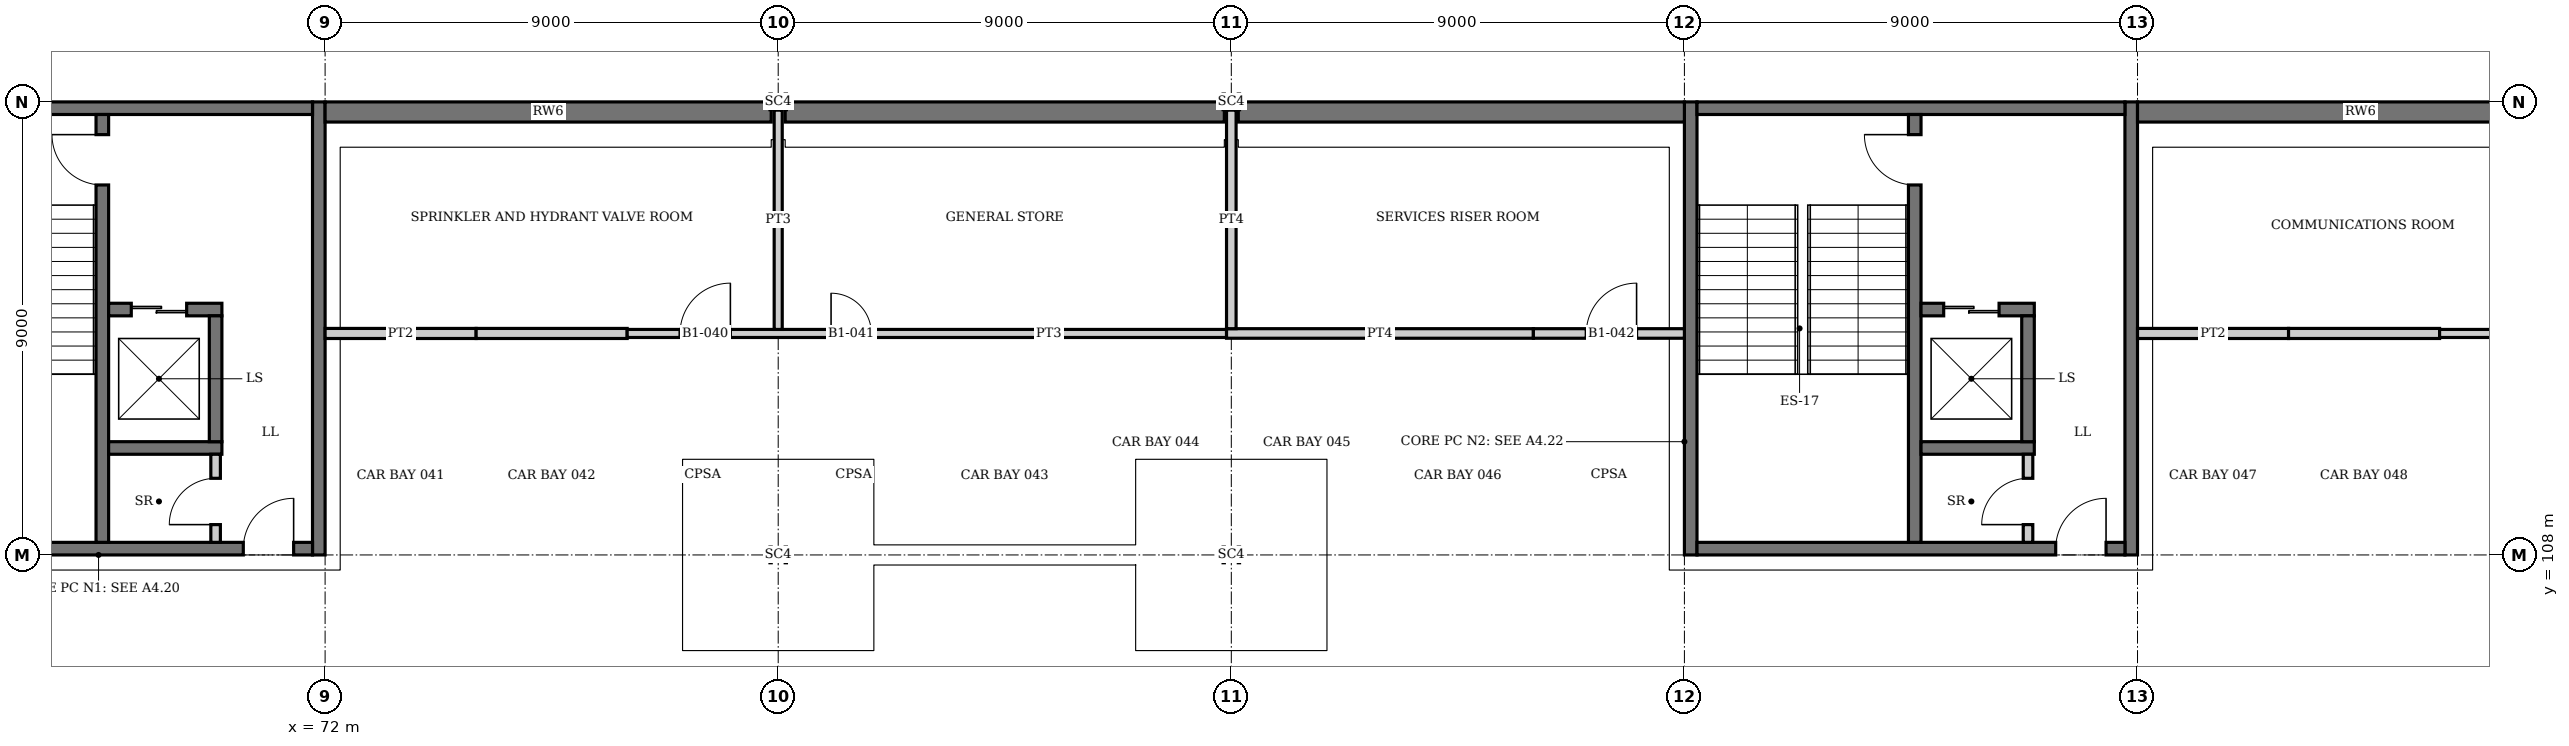
"""IFC4 building model, lengths in metres.
Left out: names, types, materials, properties, quantities, classifications, styles, units other than length and angle.
Written with IfcOpenShell. Run it as: python <this file> out.ifc"""

import sys

from ifc_helpers import new_model, si_unit, direction, frame, frame_2d, origin, origin_2d, place, context, subcontext, project, spatial, rectangle, i_section, extrude, element, fill, save


model = new_model("IFC4")
c1 = context("Model", 3, precision=1e-05, world=origin(), true_north=direction((0.0, 1.0)))
c2 = subcontext(c1, "Body", "Model", "MODEL_VIEW")
j1 = project(units=[si_unit("LENGTHUNIT", "METRE"), si_unit("PLANEANGLEUNIT", "RADIAN")], contexts=[c1])
p1 = place(None, origin())
s1 = spatial("IfcSite", under=j1, at=p1, CompositionType="ELEMENT")
p2 = place(p1, origin())
s2 = spatial("IfcBuilding", under=s1, at=p2, CompositionType="ELEMENT")
p3 = place(p2, frame((0.0, 0.0, -4.5)))
s3 = spatial("IfcBuildingStorey", under=s2, at=p3, CompositionType="ELEMENT", Elevation=-4.5)
for number, where, z_axis, x_axis in (
    (1, (81.0, 108.0, 0.0), (0.0, 0.0, 1.0), (0.0, 1.0, 0.0)),
    (2, (81.0, 117.0, 0.0), (0.0, 0.0, 1.0), (0.0, 1.0, 0.0)),
    (3, (90.0, 108.0, 0.0), (0.0, 0.0, 1.0), (0.0, 1.0, 0.0)),
    (4, (90.0, 117.0, 0.0), (0.0, 0.0, 1.0), (0.0, 1.0, 0.0)),
):
    element("IfcColumn", number, at=place(p3, frame(where, z_axis=z_axis, x_axis=x_axis)), inside=s3, PredefinedType="COLUMN", context=c2, shape_type="SweptSolid", body=[
        extrude(i_section(OverallWidth=0.311, OverallDepth=0.327, WebThickness=0.016, FlangeThickness=0.025, at=origin_2d()), origin(), (0.0, 0.0, 1.0), 4.5),
    ])
p4 = place(p3, frame((71.875, 108.0, 0.0), z_axis=(0.0, 0.0, 1.0), x_axis=(0.0, 1.0, 0.0)))
e5 = element("IfcWall", 5, at=p4, inside=s3, PredefinedType="SHEAR", context=c2, shape_type="SweptSolid", body=[
    extrude(rectangle(XDim=9.0, YDim=0.25, at=frame_2d((4.5, 0.0))), origin(), (0.0, 0.0, 1.0), 4.5),
])
p5 = place(p3, frame((63.25, 108.125, 0.0), z_axis=(0.0, 0.0, 1.0), x_axis=(1.0, 0.0, 0.0)))
e6 = element("IfcWall", 6, at=p5, inside=s3, PredefinedType="SHEAR", context=c2, shape_type="SweptSolid", body=[
    extrude(rectangle(XDim=8.5, YDim=0.25, at=frame_2d((4.25, 0.0))), origin(), (0.0, 0.0, 1.0), 4.5),
])
p6 = place(p5, frame((7.125, 0.0, 0.0)))
e7 = element("IfcOpeningElement", 7, at=p6, cuts=e6, PredefinedType="OPENING", context=c2, shape_type="SweptSolid", body=[
    extrude(rectangle(XDim=1.0, YDim=2.1, at=frame_2d((0.5, 1.05))), frame((0.0, 0.135, 0.0), z_axis=(0.0, -1.0, 0.0), x_axis=(1.0, 0.0, 0.0)), (0.0, 0.0, 1.0), 0.27),
])
p7 = place(p3, frame((63.25, 116.875, 0.0), z_axis=(0.0, 0.0, 1.0), x_axis=(1.0, 0.0, 0.0)))
e8 = element("IfcWall", 8, at=p7, inside=s3, PredefinedType="SHEAR", context=c2, shape_type="SweptSolid", body=[
    extrude(rectangle(XDim=8.5, YDim=0.25, at=frame_2d((4.25, 0.0))), origin(), (0.0, 0.0, 1.0), 4.5),
])
for number, where, z_axis, x_axis in (
    (9, (99.125, 108.0, 0.0), (0.0, 0.0, 1.0), (0.0, 1.0, 0.0)),
    (10, (107.875, 108.0, 0.0), (0.0, 0.0, 1.0), (0.0, 1.0, 0.0)),
):
    element("IfcWall", number, at=place(p3, frame(where, z_axis=z_axis, x_axis=x_axis)), inside=s3, PredefinedType="SHEAR", context=c2, shape_type="SweptSolid", body=[
        extrude(rectangle(XDim=9.0, YDim=0.25, at=frame_2d((4.5, 0.0))), origin(), (0.0, 0.0, 1.0), 4.5),
    ])
p8 = place(p3, frame((99.25, 108.125, 0.0), z_axis=(0.0, 0.0, 1.0), x_axis=(1.0, 0.0, 0.0)))
e11 = element("IfcWall", 11, at=p8, inside=s3, PredefinedType="SHEAR", context=c2, shape_type="SweptSolid", body=[
    extrude(rectangle(XDim=8.5, YDim=0.25, at=frame_2d((4.25, 0.0))), origin(), (0.0, 0.0, 1.0), 4.5),
])
p9 = place(p8, frame((7.125, 0.0, 0.0)))
e12 = element("IfcOpeningElement", 12, at=p9, cuts=e11, PredefinedType="OPENING", context=c2, shape_type="SweptSolid", body=[
    extrude(rectangle(XDim=1.0, YDim=2.1, at=frame_2d((0.5, 1.05))), frame((0.0, 0.135, 0.0), z_axis=(0.0, -1.0, 0.0), x_axis=(1.0, 0.0, 0.0)), (0.0, 0.0, 1.0), 0.27),
])
p10 = place(p3, frame((99.25, 116.875, 0.0), z_axis=(0.0, 0.0, 1.0), x_axis=(1.0, 0.0, 0.0)))
e13 = element("IfcWall", 13, at=p10, inside=s3, PredefinedType="SHEAR", context=c2, shape_type="SweptSolid", body=[
    extrude(rectangle(XDim=8.5, YDim=0.25, at=frame_2d((4.25, 0.0))), origin(), (0.0, 0.0, 1.0), 4.5),
])
p11 = place(p3, frame((72.0, 116.8, 0.0), z_axis=(0.0, 0.0, 1.0), x_axis=(1.0, 0.0, 0.0)))
e14 = element("IfcWall", 14, at=p11, inside=s3, PredefinedType="SOLIDWALL", context=c2, shape_type="SweptSolid", body=[
    extrude(rectangle(XDim=8.862, YDim=0.4, at=frame_2d((4.431, 0.0))), origin(), (0.0, 0.0, 1.0), 4.5),
])
p12 = place(p3, frame((81.138, 116.8, 0.0), z_axis=(0.0, 0.0, 1.0), x_axis=(1.0, 0.0, 0.0)))
e15 = element("IfcWall", 15, at=p12, inside=s3, PredefinedType="SOLIDWALL", context=c2, shape_type="SweptSolid", body=[
    extrude(rectangle(XDim=8.723, YDim=0.4, at=frame_2d((4.362, 0.0))), origin(), (0.0, 0.0, 1.0), 4.5),
])
for number, where, z_axis, x_axis in (
    (16, (90.138, 116.8, 0.0), (0.0, 0.0, 1.0), (1.0, 0.0, 0.0)),
    (17, (108.0, 116.8, 0.0), (0.0, 0.0, 1.0), (1.0, 0.0, 0.0)),
):
    element("IfcWall", number, at=place(p3, frame(where, z_axis=z_axis, x_axis=x_axis)), inside=s3, PredefinedType="SOLIDWALL", context=c2, shape_type="SweptSolid", body=[
        extrude(rectangle(XDim=8.862, YDim=0.4, at=frame_2d((4.431, 0.0))), origin(), (0.0, 0.0, 1.0), 4.5),
    ])
p13 = place(p3, frame((67.575, 116.75, 0.0), z_axis=(0.0, 0.0, 1.0), x_axis=(0.0, -1.0, 0.0)))
e18 = element("IfcWall", 18, at=p13, inside=s3, PredefinedType="SOLIDWALL", context=c2, shape_type="SweptSolid", body=[
    extrude(rectangle(XDim=8.5, YDim=0.25, at=frame_2d((4.25, 0.0))), origin(), (0.0, 0.0, 1.0), 4.25),
])
p14 = place(p13, frame((0.4, 0.0, 0.0)))
e19 = element("IfcOpeningElement", 19, at=p14, cuts=e18, PredefinedType="OPENING", context=c2, shape_type="SweptSolid", body=[
    extrude(rectangle(XDim=1.0, YDim=2.1, at=frame_2d((0.5, 1.05))), frame((0.0, 0.135, 0.0), z_axis=(0.0, -1.0, 0.0), x_axis=(1.0, 0.0, 0.0)), (0.0, 0.0, 1.0), 0.27),
])
p15 = place(p3, frame((67.7, 110.125, 0.0), z_axis=(0.0, 0.0, 1.0), x_axis=(1.0, 0.0, 0.0)))
e20 = element("IfcWall", 20, at=p15, inside=s3, PredefinedType="SOLIDWALL", context=c2, shape_type="SweptSolid", body=[
    extrude(rectangle(XDim=2.25, YDim=0.25, at=frame_2d((1.125, 0.0))), origin(), (0.0, 0.0, 1.0), 4.5),
])
p16 = place(p3, frame((67.7, 112.875, 0.0), z_axis=(0.0, 0.0, 1.0), x_axis=(1.0, 0.0, 0.0)))
e21 = element("IfcWall", 21, at=p16, inside=s3, PredefinedType="SOLIDWALL", context=c2, shape_type="SweptSolid", body=[
    extrude(rectangle(XDim=2.25, YDim=0.25, at=frame_2d((1.125, 0.0))), origin(), (0.0, 0.0, 1.0), 4.5),
])
p17 = place(p16, frame((0.45, 0.0, 0.0)))
e22 = element("IfcOpeningElement", 22, at=p17, cuts=e21, PredefinedType="OPENING", context=c2, shape_type="SweptSolid", body=[
    extrude(rectangle(XDim=1.1, YDim=2.1, at=frame_2d((0.55, 1.05))), frame((0.0, 0.135, 0.0), z_axis=(0.0, -1.0, 0.0), x_axis=(1.0, 0.0, 0.0)), (0.0, 0.0, 1.0), 0.27),
])
p18 = place(p3, frame((69.825, 110.25, 0.0), z_axis=(0.0, 0.0, 1.0), x_axis=(0.0, 1.0, 0.0)))
e23 = element("IfcWall", 23, at=p18, inside=s3, PredefinedType="SOLIDWALL", context=c2, shape_type="SweptSolid", body=[
    extrude(rectangle(XDim=2.5, YDim=0.25, at=frame_2d((1.25, 0.0))), origin(), (0.0, 0.0, 1.0), 4.5),
])
p19 = place(p3, frame((103.575, 116.75, 0.0), z_axis=(0.0, 0.0, 1.0), x_axis=(0.0, -1.0, 0.0)))
e24 = element("IfcWall", 24, at=p19, inside=s3, PredefinedType="SOLIDWALL", context=c2, shape_type="SweptSolid", body=[
    extrude(rectangle(XDim=8.5, YDim=0.25, at=frame_2d((4.25, 0.0))), origin(), (0.0, 0.0, 1.0), 4.25),
])
p20 = place(p19, frame((0.4, 0.0, 0.0)))
e25 = element("IfcOpeningElement", 25, at=p20, cuts=e24, PredefinedType="OPENING", context=c2, shape_type="SweptSolid", body=[
    extrude(rectangle(XDim=1.0, YDim=2.1, at=frame_2d((0.5, 1.05))), frame((0.0, 0.135, 0.0), z_axis=(0.0, -1.0, 0.0), x_axis=(1.0, 0.0, 0.0)), (0.0, 0.0, 1.0), 0.27),
])
p21 = place(p3, frame((103.7, 110.125, 0.0), z_axis=(0.0, 0.0, 1.0), x_axis=(1.0, 0.0, 0.0)))
e26 = element("IfcWall", 26, at=p21, inside=s3, PredefinedType="SOLIDWALL", context=c2, shape_type="SweptSolid", body=[
    extrude(rectangle(XDim=2.25, YDim=0.25, at=frame_2d((1.125, 0.0))), origin(), (0.0, 0.0, 1.0), 4.5),
])
p22 = place(p3, frame((103.7, 112.875, 0.0), z_axis=(0.0, 0.0, 1.0), x_axis=(1.0, 0.0, 0.0)))
e27 = element("IfcWall", 27, at=p22, inside=s3, PredefinedType="SOLIDWALL", context=c2, shape_type="SweptSolid", body=[
    extrude(rectangle(XDim=2.25, YDim=0.25, at=frame_2d((1.125, 0.0))), origin(), (0.0, 0.0, 1.0), 4.5),
])
p23 = place(p22, frame((0.45, 0.0, 0.0)))
e28 = element("IfcOpeningElement", 28, at=p23, cuts=e27, PredefinedType="OPENING", context=c2, shape_type="SweptSolid", body=[
    extrude(rectangle(XDim=1.1, YDim=2.1, at=frame_2d((0.55, 1.05))), frame((0.0, 0.135, 0.0), z_axis=(0.0, -1.0, 0.0), x_axis=(1.0, 0.0, 0.0)), (0.0, 0.0, 1.0), 0.27),
])
p24 = place(p3, frame((105.825, 110.25, 0.0), z_axis=(0.0, 0.0, 1.0), x_axis=(0.0, 1.0, 0.0)))
e29 = element("IfcWall", 29, at=p24, inside=s3, PredefinedType="SOLIDWALL", context=c2, shape_type="SweptSolid", body=[
    extrude(rectangle(XDim=2.5, YDim=0.25, at=frame_2d((1.25, 0.0))), origin(), (0.0, 0.0, 1.0), 4.5),
])
p25 = place(p3, frame((72.0, 112.4, 0.0), z_axis=(0.0, 0.0, 1.0), x_axis=(1.0, 0.0, 0.0)))
e30 = element("IfcWall", 30, at=p25, inside=s3, PredefinedType="PARTITIONING", context=c2, shape_type="SweptSolid", body=[
    extrude(rectangle(XDim=3.0, YDim=0.2, at=frame_2d((1.5, 0.0))), origin(), (0.0, 0.0, 1.0), 4.25),
])
p26 = place(p3, frame((75.0, 112.4, 0.0), z_axis=(0.0, 0.0, 1.0), x_axis=(1.0, 0.0, 0.0)))
e31 = element("IfcWall", 31, at=p26, inside=s3, PredefinedType="PARTITIONING", context=c2, shape_type="SweptSolid", body=[
    extrude(rectangle(XDim=3.0, YDim=0.2, at=frame_2d((1.5, 0.0))), origin(), (0.0, 0.0, 1.0), 3.79),
])
p27 = place(p3, frame((78.0, 112.4, 0.0), z_axis=(0.0, 0.0, 1.0), x_axis=(1.0, 0.0, 0.0)))
e32 = element("IfcWall", 32, at=p27, inside=s3, PredefinedType="PARTITIONING", context=c2, shape_type="SweptSolid", body=[
    extrude(rectangle(XDim=11.905, YDim=0.16, at=frame_2d((5.953, 0.0))), origin(), (0.0, 0.0, 1.0), 3.79),
])
p28 = place(p27, frame((1.05, 0.0, 0.0)))
e33 = element("IfcOpeningElement", 33, at=p28, cuts=e32, PredefinedType="OPENING", context=c2, shape_type="SweptSolid", body=[
    extrude(rectangle(XDim=1.0, YDim=2.1, at=frame_2d((0.5, 1.05))), frame((0.0, 0.09, 0.0), z_axis=(0.0, -1.0, 0.0), x_axis=(1.0, 0.0, 0.0)), (0.0, 0.0, 1.0), 0.18),
])
p29 = place(p27, frame((4.05, 0.0, 0.0)))
e34 = element("IfcOpeningElement", 34, at=p29, cuts=e32, PredefinedType="OPENING", context=c2, shape_type="SweptSolid", body=[
    extrude(rectangle(XDim=0.8, YDim=2.0, at=frame_2d((0.4, 1.0))), frame((0.0, 0.09, 0.0), z_axis=(0.0, -1.0, 0.0), x_axis=(1.0, 0.0, 0.0)), (0.0, 0.0, 1.0), 0.18),
])
p30 = place(p3, frame((89.905, 112.4, 0.0), z_axis=(0.0, 0.0, 1.0), x_axis=(1.0, 0.0, 0.0)))
e35 = element("IfcWall", 35, at=p30, inside=s3, PredefinedType="PARTITIONING", context=c2, shape_type="SweptSolid", body=[
    extrude(rectangle(XDim=6.095, YDim=0.19, at=frame_2d((3.047, 0.0))), origin(), (0.0, 0.0, 1.0), 3.79),
])
p31 = place(p3, frame((96.0, 112.4, 0.0), z_axis=(0.0, 0.0, 1.0), x_axis=(1.0, 0.0, 0.0)))
e36 = element("IfcWall", 36, at=p31, inside=s3, PredefinedType="PARTITIONING", context=c2, shape_type="SweptSolid", body=[
    extrude(rectangle(XDim=3.0, YDim=0.19, at=frame_2d((1.5, 0.0))), origin(), (0.0, 0.0, 1.0), 4.25),
])
p32 = place(p31, frame((1.05, 0.0, 0.0)))
e37 = element("IfcOpeningElement", 37, at=p32, cuts=e36, PredefinedType="OPENING", context=c2, shape_type="SweptSolid", body=[
    extrude(rectangle(XDim=1.0, YDim=2.4, at=frame_2d((0.5, 1.2))), frame((0.0, 0.105, 0.0), z_axis=(0.0, -1.0, 0.0), x_axis=(1.0, 0.0, 0.0)), (0.0, 0.0, 1.0), 0.21),
])
p33 = place(p3, frame((108.0, 112.4, 0.0), z_axis=(0.0, 0.0, 1.0), x_axis=(1.0, 0.0, 0.0)))
e38 = element("IfcWall", 38, at=p33, inside=s3, PredefinedType="PARTITIONING", context=c2, shape_type="SweptSolid", body=[
    extrude(rectangle(XDim=3.0, YDim=0.2, at=frame_2d((1.5, 0.0))), origin(), (0.0, 0.0, 1.0), 4.25),
])
p34 = place(p3, frame((111.0, 112.4, 0.0), z_axis=(0.0, 0.0, 1.0), x_axis=(1.0, 0.0, 0.0)))
e39 = element("IfcWall", 39, at=p34, inside=s3, PredefinedType="PARTITIONING", context=c2, shape_type="SweptSolid", body=[
    extrude(rectangle(XDim=3.0, YDim=0.2, at=frame_2d((1.5, 0.0))), origin(), (0.0, 0.0, 1.0), 3.79),
])
p35 = place(p3, frame((114.0, 112.4, 0.0), z_axis=(0.0, 0.0, 1.0), x_axis=(1.0, 0.0, 0.0)))
e40 = element("IfcWall", 40, at=p35, inside=s3, PredefinedType="PARTITIONING", context=c2, shape_type="SweptSolid", body=[
    extrude(rectangle(XDim=12.08, YDim=0.16, at=frame_2d((6.04, 0.0))), origin(), (0.0, 0.0, 1.0), 3.79),
])
p36 = place(p35, frame((1.05, 0.0, 0.0)))
e41 = element("IfcOpeningElement", 41, at=p36, cuts=e40, PredefinedType="OPENING", context=c2, shape_type="SweptSolid", body=[
    extrude(rectangle(XDim=1.0, YDim=2.4, at=frame_2d((0.5, 1.2))), frame((0.0, 0.09, 0.0), z_axis=(0.0, -1.0, 0.0), x_axis=(1.0, 0.0, 0.0)), (0.0, 0.0, 1.0), 0.18),
])
p37 = place(p35, frame((4.05, 0.0, 0.0)))
e42 = element("IfcOpeningElement", 42, at=p37, cuts=e40, PredefinedType="OPENING", context=c2, shape_type="SweptSolid", body=[
    extrude(rectangle(XDim=0.8, YDim=2.0, at=frame_2d((0.4, 1.0))), frame((0.0, 0.09, 0.0), z_axis=(0.0, -1.0, 0.0), x_axis=(1.0, 0.0, 0.0)), (0.0, 0.0, 1.0), 0.18),
])
p38 = place(p3, frame((69.825, 108.25, 0.0), z_axis=(0.0, 0.0, 1.0), x_axis=(0.0, 1.0, 0.0)))
e43 = element("IfcWall", 43, at=p38, inside=s3, PredefinedType="PARTITIONING", context=c2, shape_type="SweptSolid", body=[
    extrude(rectangle(XDim=1.75, YDim=0.19, at=frame_2d((0.875, 0.0))), origin(), (0.0, 0.0, 1.0), 4.25),
])
p39 = place(p38, frame((0.353, 0.0, 0.0)))
e44 = element("IfcOpeningElement", 44, at=p39, cuts=e43, PredefinedType="OPENING", context=c2, shape_type="SweptSolid", body=[
    extrude(rectangle(XDim=0.92, YDim=2.1, at=frame_2d((0.46, 1.05))), frame((0.0, 0.105, 0.0), z_axis=(0.0, -1.0, 0.0), x_axis=(1.0, 0.0, 0.0)), (0.0, 0.0, 1.0), 0.21),
])
p40 = place(p3, frame((81.0, 112.48, 0.0), z_axis=(0.0, 0.0, 1.0), x_axis=(0.0, 1.0, 0.0)))
e45 = element("IfcWall", 45, at=p40, inside=s3, PredefinedType="PARTITIONING", context=c2, shape_type="SweptSolid", body=[
    extrude(rectangle(XDim=4.356, YDim=0.16, at=frame_2d((2.178, 0.0))), origin(), (0.0, 0.0, 1.0), 3.79),
])
p41 = place(p3, frame((90.0, 112.495, 0.0), z_axis=(0.0, 0.0, 1.0), x_axis=(0.0, 1.0, 0.0)))
e46 = element("IfcWall", 46, at=p41, inside=s3, PredefinedType="PARTITIONING", context=c2, shape_type="SweptSolid", body=[
    extrude(rectangle(XDim=4.341, YDim=0.19, at=frame_2d((2.171, 0.0))), origin(), (0.0, 0.0, 1.0), 3.79),
])
p42 = place(p3, frame((105.825, 108.25, 0.0), z_axis=(0.0, 0.0, 1.0), x_axis=(0.0, 1.0, 0.0)))
e47 = element("IfcWall", 47, at=p42, inside=s3, PredefinedType="PARTITIONING", context=c2, shape_type="SweptSolid", body=[
    extrude(rectangle(XDim=1.75, YDim=0.19, at=frame_2d((0.875, 0.0))), origin(), (0.0, 0.0, 1.0), 4.25),
])
p43 = place(p42, frame((0.353, 0.0, 0.0)))
e48 = element("IfcOpeningElement", 48, at=p43, cuts=e47, PredefinedType="OPENING", context=c2, shape_type="SweptSolid", body=[
    extrude(rectangle(XDim=0.92, YDim=2.1, at=frame_2d((0.46, 1.05))), frame((0.0, 0.105, 0.0), z_axis=(0.0, -1.0, 0.0), x_axis=(1.0, 0.0, 0.0)), (0.0, 0.0, 1.0), 0.21),
])
p44 = place(p17, origin())
e49 = element("IfcDoor", 49, at=p44, inside=s3, OperationType="DOUBLE_DOOR_SLIDING", PredefinedType="DOOR", context=c2, shape_type="SweptSolid", body=[
    extrude(rectangle(XDim=1.1, YDim=2.1, at=frame_2d((0.55, 1.05))), frame((0.0, 0.025, 0.0), z_axis=(0.0, -1.0, 0.0), x_axis=(1.0, 0.0, 0.0)), (0.0, 0.0, 1.0), 0.05),
])
fill(e22, e49)
p45 = place(p23, origin())
e50 = element("IfcDoor", 50, at=p45, inside=s3, OperationType="DOUBLE_DOOR_SLIDING", PredefinedType="DOOR", context=c2, shape_type="SweptSolid", body=[
    extrude(rectangle(XDim=1.1, YDim=2.1, at=frame_2d((0.55, 1.05))), frame((0.0, 0.025, 0.0), z_axis=(0.0, -1.0, 0.0), x_axis=(1.0, 0.0, 0.0)), (0.0, 0.0, 1.0), 0.05),
])
fill(e28, e50)
p46 = place(p14, frame((1.0, 0.0, 0.0), z_axis=(0.0, 0.0, 1.0), x_axis=(-1.0, 0.0, 0.0)))
e51 = element("IfcDoor", 51, at=p46, inside=s3, OperationType="SINGLE_SWING_RIGHT", PredefinedType="DOOR", context=c2, shape_type="SweptSolid", body=[
    extrude(rectangle(XDim=1.0, YDim=2.1, at=frame_2d((0.5, 1.05))), frame((0.0, 0.025, 0.0), z_axis=(0.0, -1.0, 0.0), x_axis=(1.0, 0.0, 0.0)), (0.0, 0.0, 1.0), 0.05),
])
fill(e19, e51)
p47 = place(p39, origin())
e52 = element("IfcDoor", 52, at=p47, inside=s3, OperationType="SINGLE_SWING_LEFT", PredefinedType="DOOR", context=c2, shape_type="SweptSolid", body=[
    extrude(rectangle(XDim=0.92, YDim=2.1, at=frame_2d((0.46, 1.05))), frame((0.0, 0.025, 0.0), z_axis=(0.0, -1.0, 0.0), x_axis=(1.0, 0.0, 0.0)), (0.0, 0.0, 1.0), 0.05),
])
fill(e44, e52)
p48 = place(p20, frame((1.0, 0.0, 0.0), z_axis=(0.0, 0.0, 1.0), x_axis=(-1.0, 0.0, 0.0)))
e53 = element("IfcDoor", 53, at=p48, inside=s3, OperationType="SINGLE_SWING_RIGHT", PredefinedType="DOOR", context=c2, shape_type="SweptSolid", body=[
    extrude(rectangle(XDim=1.0, YDim=2.1, at=frame_2d((0.5, 1.05))), frame((0.0, 0.025, 0.0), z_axis=(0.0, -1.0, 0.0), x_axis=(1.0, 0.0, 0.0)), (0.0, 0.0, 1.0), 0.05),
])
fill(e25, e53)
p49 = place(p43, origin())
e54 = element("IfcDoor", 54, at=p49, inside=s3, OperationType="SINGLE_SWING_LEFT", PredefinedType="DOOR", context=c2, shape_type="SweptSolid", body=[
    extrude(rectangle(XDim=0.92, YDim=2.1, at=frame_2d((0.46, 1.05))), frame((0.0, 0.025, 0.0), z_axis=(0.0, -1.0, 0.0), x_axis=(1.0, 0.0, 0.0)), (0.0, 0.0, 1.0), 0.05),
])
fill(e48, e54)
p50 = place(p6, origin())
e55 = element("IfcDoor", 55, at=p50, inside=s3, OperationType="SINGLE_SWING_RIGHT", PredefinedType="DOOR", context=c2, shape_type="SweptSolid", body=[
    extrude(rectangle(XDim=1.0, YDim=2.1, at=frame_2d((0.5, 1.05))), frame((0.0, 0.025, 0.0), z_axis=(0.0, -1.0, 0.0), x_axis=(1.0, 0.0, 0.0)), (0.0, 0.0, 1.0), 0.05),
])
fill(e7, e55)
p51 = place(p9, origin())
e56 = element("IfcDoor", 56, at=p51, inside=s3, OperationType="SINGLE_SWING_RIGHT", PredefinedType="DOOR", context=c2, shape_type="SweptSolid", body=[
    extrude(rectangle(XDim=1.0, YDim=2.1, at=frame_2d((0.5, 1.05))), frame((0.0, 0.025, 0.0), z_axis=(0.0, -1.0, 0.0), x_axis=(1.0, 0.0, 0.0)), (0.0, 0.0, 1.0), 0.05),
])
fill(e12, e56)
p52 = place(p28, origin())
e57 = element("IfcDoor", 57, at=p52, inside=s3, OperationType="SINGLE_SWING_RIGHT", PredefinedType="DOOR", context=c2, shape_type="SweptSolid", body=[
    extrude(rectangle(XDim=1.0, YDim=2.1, at=frame_2d((0.5, 1.05))), frame((0.0, 0.025, 0.0), z_axis=(0.0, -1.0, 0.0), x_axis=(1.0, 0.0, 0.0)), (0.0, 0.0, 1.0), 0.05),
])
fill(e33, e57)
p53 = place(p29, origin())
e58 = element("IfcDoor", 58, at=p53, inside=s3, OperationType="SINGLE_SWING_LEFT", PredefinedType="DOOR", context=c2, shape_type="SweptSolid", body=[
    extrude(rectangle(XDim=0.8, YDim=2.0, at=frame_2d((0.4, 1.0))), frame((0.0, 0.025, 0.0), z_axis=(0.0, -1.0, 0.0), x_axis=(1.0, 0.0, 0.0)), (0.0, 0.0, 1.0), 0.05),
])
fill(e34, e58)
p54 = place(p32, origin())
e59 = element("IfcDoor", 59, at=p54, inside=s3, OperationType="SINGLE_SWING_RIGHT", PredefinedType="DOOR", context=c2, shape_type="SweptSolid", body=[
    extrude(rectangle(XDim=1.0, YDim=2.4, at=frame_2d((0.5, 1.2))), frame((0.0, 0.025, 0.0), z_axis=(0.0, -1.0, 0.0), x_axis=(1.0, 0.0, 0.0)), (0.0, 0.0, 1.0), 0.05),
])
fill(e37, e59)
save(model, sys.argv[1])
